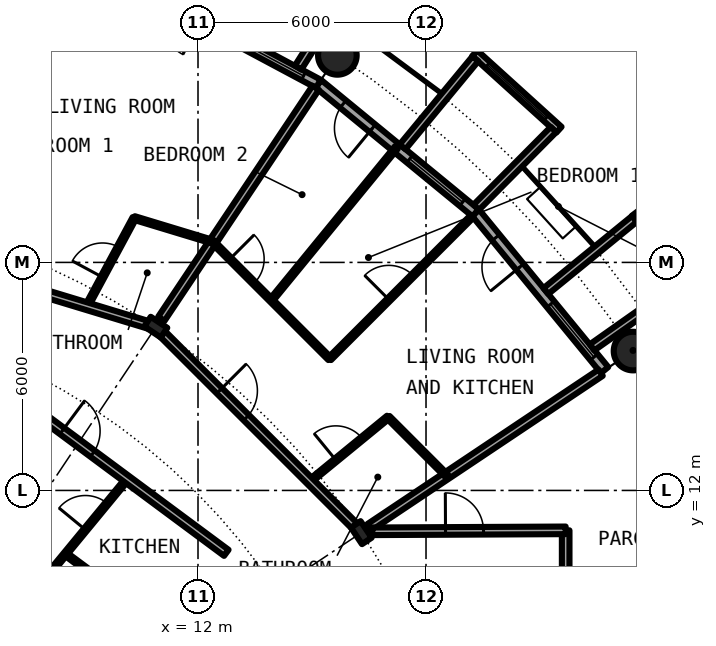
"""IFC4 building model, lengths in metres.
Left out: names, types, materials, properties, quantities, classifications, styles, units other than length and angle.
Written with IfcOpenShell. Run it as: python <this file> out.ifc"""

import sys

from ifc_helpers import new_model, si_unit, direction, frame, frame_2d, origin, origin_2d, place, context, subcontext, project, spatial, rectangle, circle, hollow_circle, i_section, extrude, element, fill, save


model = new_model("IFC4")
c1 = context("Model", 3, precision=1e-05, world=origin(), true_north=direction((0.0, 1.0)))
c2 = subcontext(c1, "Body", "Model", "MODEL_VIEW")
j1 = project(units=[si_unit("LENGTHUNIT", "METRE"), si_unit("PLANEANGLEUNIT", "RADIAN")], contexts=[c1])
p1 = place(None, origin())
s1 = spatial("IfcSite", under=j1, at=p1, CompositionType="ELEMENT")
p2 = place(p1, origin())
s2 = spatial("IfcBuilding", under=s1, at=p2, CompositionType="ELEMENT")
p3 = place(p2, frame((0.0, 0.0, 91.05)))
s3 = spatial("IfcBuildingStorey", under=s2, at=p3, CompositionType="ELEMENT", Elevation=91.05)
for number, where, z_axis, x_axis in (
    (1, (23.448, 15.667, 0.0), (0.0, 0.0, 1.0), (1.0, 0.0, 0.0)),
    (2, (15.667, 23.448, 0.0), (0.0, 0.0, 1.0), (1.0, 0.0, 0.0)),
):
    element("IfcColumn", number, at=place(p3, frame(where, z_axis=z_axis, x_axis=x_axis)), inside=s3, PredefinedType="COLUMN", context=c2, shape_type="SweptSolid", body=[
        extrude(hollow_circle(Radius=0.508, WallThickness=0.04, at=origin_2d()), origin(), (0.0, 0.0, 1.0), 3.05),
    ])
for number, where, z_axis, x_axis in (
    (3, (16.297, 10.889, 0.0), (0.0, 0.0, 1.0), (0.831, 0.556, 0.0)),
    (4, (10.889, 16.297, 0.0), (0.0, 0.0, 1.0), (0.556, 0.831, 0.0)),
):
    element("IfcColumn", number, at=place(p3, frame(where, z_axis=z_axis, x_axis=x_axis)), inside=s3, PredefinedType="COLUMN", context=c2, shape_type="SweptSolid", body=[
        extrude(i_section(OverallWidth=0.306, OverallDepth=0.524, WebThickness=0.021, FlangeThickness=0.04, FilletRadius=0.027, at=origin_2d()), origin(), (0.0, 0.0, 1.0), 3.05),
    ])
p4 = place(p3, frame((22.699, 15.167, 0.0), z_axis=(0.0, 0.0, 1.0), x_axis=(-0.634382322723, 0.773019449054, 0.0)))
e5 = element("IfcWall", 5, at=p4, inside=s3, PredefinedType="SOLIDWALL", context=c2, shape_type="SweptSolid", body=[
    extrude(rectangle(XDim=5.352, YDim=0.25, at=frame_2d((2.676, 0.0))), origin(), (0.0, 0.0, 1.0), 2.7),
])
p5 = place(p4, frame((0.441, 0.0, 0.3)))
e6 = element("IfcOpeningElement", 6, at=p5, cuts=e5, PredefinedType="OPENING", context=c2, shape_type="SweptSolid", body=[
    extrude(rectangle(XDim=1.8, YDim=2.1, at=frame_2d((0.9, 1.05))), frame((0.0, 0.135, 0.0), z_axis=(0.0, -1.0, 0.0), x_axis=(1.0, 0.0, 0.0)), (0.0, 0.0, 1.0), 0.27),
])
p6 = place(p4, frame((3.51, 0.0, 0.0)))
e7 = element("IfcOpeningElement", 7, at=p6, cuts=e5, PredefinedType="OPENING", context=c2, shape_type="SweptSolid", body=[
    extrude(rectangle(XDim=1.0, YDim=2.2, at=frame_2d((0.5, 1.1))), frame((0.0, 0.135, 0.0), z_axis=(0.0, -1.0, 0.0), x_axis=(1.0, 0.0, 0.0)), (0.0, 0.0, 1.0), 0.27),
])
p7 = place(p3, frame((24.909, 17.427, -0.03), z_axis=(0.0, 0.0, 1.0), x_axis=(-0.60418752353, 0.796842165306, 0.0)))
e8 = element("IfcWall", 8, at=p7, inside=s3, PredefinedType="SOLIDWALL", context=c2, shape_type="SweptSolid", body=[
    extrude(rectangle(XDim=2.337, YDim=0.2, at=frame_2d((1.168, 0.0))), origin(), (0.0, 0.0, 1.0), 2.73),
])
p8 = place(p7, frame((0.128, 0.0, 0.33)))
e9 = element("IfcOpeningElement", 9, at=p8, cuts=e8, PredefinedType="OPENING", context=c2, shape_type="SweptSolid", body=[
    extrude(circle(Radius=1.04, at=frame_2d((1.04, 1.04))), frame((0.0, 0.11, 0.0), z_axis=(0.0, -1.0, 0.0), x_axis=(1.0, 0.0, 0.0)), (0.0, 0.0, 1.0), 0.22),
])
p9 = place(p3, frame((22.37, 15.765, -0.03), z_axis=(0.0, 0.0, 1.0), x_axis=(0.817256123454, 0.576274612209, 0.0)))
e10 = element("IfcWall", 10, at=p9, inside=s3, PredefinedType="SOLIDWALL", context=c2, shape_type="SweptSolid", body=[
    extrude(rectangle(XDim=2.933, YDim=0.2, at=frame_2d((1.466, 0.0))), origin(), (0.0, 0.0, 1.0), 2.73),
])
p10 = place(p3, frame((21.155, 17.246, -0.03), z_axis=(0.0, 0.0, 1.0), x_axis=(0.775179004516, 0.631741648902, 0.0)))
e11 = element("IfcWall", 11, at=p10, inside=s3, PredefinedType="SOLIDWALL", context=c2, shape_type="SweptSolid", body=[
    extrude(rectangle(XDim=3.006, YDim=0.2, at=frame_2d((1.503, 0.0))), origin(), (0.0, 0.0, 1.0), 2.73),
])
p11 = place(p3, frame((19.304, 19.304, 0.0), z_axis=(0.0, 0.0, 1.0), x_axis=(-0.773019449054, 0.634382322723, 0.0)))
e12 = element("IfcWall", 12, at=p11, inside=s3, PredefinedType="SOLIDWALL", context=c2, shape_type="SweptSolid", body=[
    extrude(rectangle(XDim=5.352, YDim=0.25, at=frame_2d((2.676, 0.0))), origin(), (0.0, 0.0, 1.0), 2.7),
])
p12 = place(p11, frame((0.441, 0.0, 0.3)))
e13 = element("IfcOpeningElement", 13, at=p12, cuts=e12, PredefinedType="OPENING", context=c2, shape_type="SweptSolid", body=[
    extrude(rectangle(XDim=1.8, YDim=2.1, at=frame_2d((0.9, 1.05))), frame((0.0, 0.135, 0.0), z_axis=(0.0, -1.0, 0.0), x_axis=(1.0, 0.0, 0.0)), (0.0, 0.0, 1.0), 0.27),
])
p13 = place(p11, frame((3.51, 0.0, 0.0)))
e14 = element("IfcOpeningElement", 14, at=p13, cuts=e12, PredefinedType="OPENING", context=c2, shape_type="SweptSolid", body=[
    extrude(rectangle(XDim=1.0, YDim=2.2, at=frame_2d((0.5, 1.1))), frame((0.0, 0.135, 0.0), z_axis=(0.0, -1.0, 0.0), x_axis=(1.0, 0.0, 0.0)), (0.0, 0.0, 1.0), 0.27),
])
p14 = place(p3, frame((21.5, 21.493, -0.03), z_axis=(0.0, 0.0, 1.0), x_axis=(-0.740998365753, 0.671506829416, 0.0)))
e15 = element("IfcWall", 15, at=p14, inside=s3, PredefinedType="SOLIDWALL", context=c2, shape_type="SweptSolid", body=[
    extrude(rectangle(XDim=2.993, YDim=0.2, at=frame_2d((1.497, 0.0))), origin(), (0.0, 0.0, 1.0), 2.73),
])
p15 = place(p14, frame((0.457, 0.0, 0.33)))
e16 = element("IfcOpeningElement", 16, at=p15, cuts=e15, PredefinedType="OPENING", context=c2, shape_type="SweptSolid", body=[
    extrude(circle(Radius=1.04, at=frame_2d((1.04, 1.04))), frame((0.0, 0.11, 0.0), z_axis=(0.0, -1.0, 0.0), x_axis=(1.0, 0.0, 0.0)), (0.0, 0.0, 1.0), 0.22),
])
p16 = place(p3, frame((19.323, 19.45, -0.03), z_axis=(0.0, 0.0, 1.0), x_axis=(0.704476739375, 0.709727076896, 0.0)))
e17 = element("IfcWall", 17, at=p16, inside=s3, PredefinedType="SOLIDWALL", context=c2, shape_type="SweptSolid", body=[
    extrude(rectangle(XDim=2.883, YDim=0.2, at=frame_2d((1.441, 0.0))), origin(), (0.0, 0.0, 1.0), 2.73),
])
p17 = place(p3, frame((17.384, 21.041, -0.03), z_axis=(0.0, 0.0, 1.0), x_axis=(0.63709551667, 0.770784861449, 0.0)))
e18 = element("IfcWall", 18, at=p17, inside=s3, PredefinedType="SOLIDWALL", context=c2, shape_type="SweptSolid", body=[
    extrude(rectangle(XDim=3.006, YDim=0.2, at=frame_2d((1.503, 0.0))), origin(), (0.0, 0.0, 1.0), 2.73),
])
p18 = place(p3, frame((15.167, 22.699, 0.0), z_axis=(0.0, 0.0, 1.0), x_axis=(-0.881915646801, 0.471407246368, 0.0)))
e19 = element("IfcWall", 19, at=p18, inside=s3, PredefinedType="SOLIDWALL", context=c2, shape_type="SweptSolid", body=[
    extrude(rectangle(XDim=5.352, YDim=0.25, at=frame_2d((2.676, 0.0))), origin(), (0.0, 0.0, 1.0), 2.7),
])
p19 = place(p18, frame((0.441, 0.0, 0.3)))
e20 = element("IfcOpeningElement", 20, at=p19, cuts=e19, PredefinedType="OPENING", context=c2, shape_type="SweptSolid", body=[
    extrude(rectangle(XDim=1.8, YDim=2.1, at=frame_2d((0.9, 1.05))), frame((0.0, 0.135, 0.0), z_axis=(0.0, -1.0, 0.0), x_axis=(1.0, 0.0, 0.0)), (0.0, 0.0, 1.0), 0.27),
])
p20 = place(p18, frame((3.51, 0.0, 0.0)))
e21 = element("IfcOpeningElement", 21, at=p20, cuts=e19, PredefinedType="OPENING", context=c2, shape_type="SweptSolid", body=[
    extrude(rectangle(XDim=1.0, YDim=2.2, at=frame_2d((0.5, 1.1))), frame((0.0, 0.135, 0.0), z_axis=(0.0, -1.0, 0.0), x_axis=(1.0, 0.0, 0.0)), (0.0, 0.0, 1.0), 0.27),
])
p21 = place(p3, frame((14.635, 23.126, -0.03), z_axis=(0.0, 0.0, 1.0), x_axis=(0.534437802731, 0.845207805816, 0.0)))
e22 = element("IfcWall", 22, at=p21, inside=s3, PredefinedType="SOLIDWALL", context=c2, shape_type="SweptSolid", body=[
    extrude(rectangle(XDim=2.932, YDim=0.2, at=frame_2d((1.466, 0.0))), origin(), (0.0, 0.0, 1.0), 2.73),
])
p22 = place(p3, frame((21.675, 9.3, 0.0), z_axis=(0.0, 0.0, 1.0), x_axis=(0.0, 1.0, 0.0)))
e23 = element("IfcWall", 23, at=p22, inside=s3, PredefinedType="PARTITIONING", context=c2, shape_type="SweptSolid", body=[
    extrude(rectangle(XDim=1.65, YDim=0.2, at=frame_2d((0.825, 0.0))), origin(), (0.0, 0.0, 1.0), 2.7),
])
p23 = place(p3, frame((4.909, 5.958, 0.0), z_axis=(0.0, 0.0, 1.0), x_axis=(0.635976043025, 0.771708800454, 0.0)))
e24 = element("IfcWall", 24, at=p23, inside=s3, PredefinedType="PARTITIONING", context=c2, shape_type="SweptSolid", body=[
    extrude(rectangle(XDim=8.213, YDim=0.1, at=frame_2d((4.106, 0.0))), origin(), (0.0, 0.0, 1.0), 2.7),
])
p24 = place(p23, frame((6.49, 0.0, 0.0)))
e25 = element("IfcOpeningElement", 25, at=p24, cuts=e24, PredefinedType="OPENING", context=c2, shape_type="SweptSolid", body=[
    extrude(rectangle(XDim=0.9, YDim=2.3, at=frame_2d((0.45, 1.15))), frame((0.0, 0.06, 0.0), z_axis=(0.0, -1.0, 0.0), x_axis=(1.0, 0.0, 0.0)), (0.0, 0.0, 1.0), 0.12),
])
p25 = place(p23, frame((2.384, 0.0, 0.0)))
e26 = element("IfcOpeningElement", 26, at=p25, cuts=e24, PredefinedType="OPENING", context=c2, shape_type="SweptSolid", body=[
    extrude(rectangle(XDim=0.9, YDim=2.3, at=frame_2d((0.45, 1.15))), frame((0.0, 0.06, 0.0), z_axis=(0.0, -1.0, 0.0), x_axis=(1.0, 0.0, 0.0)), (0.0, 0.0, 1.0), 0.12),
])
p26 = place(p3, frame((9.074, 16.847, 0.0), z_axis=(0.0, 0.0, 1.0), x_axis=(0.474160570331, 0.880438387136, 0.0)))
e27 = element("IfcWall", 27, at=p26, inside=s3, PredefinedType="PARTITIONING", context=c2, shape_type="SweptSolid", body=[
    extrude(rectangle(XDim=2.636, YDim=0.1, at=frame_2d((1.318, 0.0))), origin(), (0.0, 0.0, 1.0), 2.7),
])
p27 = place(p26, frame((0.868, 0.0, 0.0)))
e28 = element("IfcOpeningElement", 28, at=p27, cuts=e27, PredefinedType="OPENING", context=c2, shape_type="SweptSolid", body=[
    extrude(rectangle(XDim=0.9, YDim=2.3, at=frame_2d((0.45, 1.15))), frame((0.0, 0.06, 0.0), z_axis=(0.0, -1.0, 0.0), x_axis=(1.0, 0.0, 0.0)), (0.0, 0.0, 1.0), 0.12),
])
p28 = place(p3, frame((11.035, 16.515, 0.0), z_axis=(0.0, 0.0, 1.0), x_axis=(0.555516661303, 0.831505405283, 0.0)))
e29 = element("IfcWall", 29, at=p28, inside=s3, PredefinedType="PARTITIONING", context=c2, shape_type="SweptSolid", body=[
    extrude(rectangle(XDim=7.312, YDim=0.2, at=frame_2d((3.656, 0.0))), origin(), (0.0, 0.0, 1.0), 2.7),
])
p29 = place(p3, frame((13.927, 17.004, 0.0), z_axis=(0.0, 0.0, 1.0), x_axis=(0.633774976367, 0.773517471898, 0.0)))
e30 = element("IfcWall", 30, at=p29, inside=s3, PredefinedType="PARTITIONING", context=c2, shape_type="SweptSolid", body=[
    extrude(rectangle(XDim=5.196, YDim=0.1, at=frame_2d((2.598, 0.0))), origin(), (0.0, 0.0, 1.0), 2.7),
])
p30 = place(p3, frame((14.945, 12.241, 0.0), z_axis=(0.0, 0.0, 1.0), x_axis=(0.77367517848, 0.633582447834, 0.0)))
e31 = element("IfcWall", 31, at=p30, inside=s3, PredefinedType="PARTITIONING", context=c2, shape_type="SweptSolid", body=[
    extrude(rectangle(XDim=2.661, YDim=0.1, at=frame_2d((1.331, 0.0))), origin(), (0.0, 0.0, 1.0), 2.7),
])
p31 = place(p30, frame((0.881, 0.0, 0.0)))
e32 = element("IfcOpeningElement", 32, at=p31, cuts=e31, PredefinedType="OPENING", context=c2, shape_type="SweptSolid", body=[
    extrude(rectangle(XDim=0.9, YDim=2.3, at=frame_2d((0.45, 1.15))), frame((0.0, 0.06, 0.0), z_axis=(0.0, -1.0, 0.0), x_axis=(1.0, 0.0, 0.0)), (0.0, 0.0, 1.0), 0.12),
])
p32 = place(p3, frame((15.465, 15.465, 0.0), z_axis=(0.0, 0.0, 1.0), x_axis=(0.707106781187, 0.707106781187, 0.0)))
e33 = element("IfcWall", 33, at=p32, inside=s3, PredefinedType="PARTITIONING", context=c2, shape_type="SweptSolid", body=[
    extrude(rectangle(XDim=5.305, YDim=0.1, at=frame_2d((2.652, 0.0))), origin(), (0.0, 0.0, 1.0), 2.7),
])
p33 = place(p32, frame((2.202, 0.0, 0.0)))
e34 = element("IfcOpeningElement", 34, at=p33, cuts=e33, PredefinedType="OPENING", context=c2, shape_type="SweptSolid", body=[
    extrude(rectangle(XDim=0.9, YDim=2.3, at=frame_2d((0.45, 1.15))), frame((0.0, 0.06, 0.0), z_axis=(0.0, -1.0, 0.0), x_axis=(1.0, 0.0, 0.0)), (0.0, 0.0, 1.0), 0.12),
])
p34 = place(p3, frame((16.515, 11.034, 0.0), z_axis=(0.0, 0.0, 1.0), x_axis=(0.831382022135, 0.555701298605, 0.0)))
e35 = element("IfcWall", 35, at=p34, inside=s3, PredefinedType="PARTITIONING", context=c2, shape_type="SweptSolid", body=[
    extrude(rectangle(XDim=7.313, YDim=0.2, at=frame_2d((3.657, 0.0))), origin(), (0.0, 0.0, 1.0), 2.7),
])
p35 = place(p3, frame((16.588, 10.925, 0.0), z_axis=(0.0, 0.0, 1.0), x_axis=(0.999988019025, 0.004895079807, 0.0)))
e36 = element("IfcWall", 36, at=p35, inside=s3, PredefinedType="PARTITIONING", context=c2, shape_type="SweptSolid", body=[
    extrude(rectangle(XDim=5.087, YDim=0.2, at=frame_2d((2.543, 0.0))), origin(), (0.0, 0.0, 1.0), 2.7),
])
p36 = place(p35, frame((1.925, 0.0, 0.0)))
e37 = element("IfcOpeningElement", 37, at=p36, cuts=e36, PredefinedType="OPENING", context=c2, shape_type="SweptSolid", body=[
    extrude(rectangle(XDim=1.0, YDim=2.3, at=frame_2d((0.5, 1.15))), frame((0.0, 0.11, 0.0), z_axis=(0.0, -1.0, 0.0), x_axis=(1.0, 0.0, 0.0)), (0.0, 0.0, 1.0), 0.22),
])
p37 = place(p3, frame((8.512, 10.332, 0.0), z_axis=(0.0, 0.0, 1.0), x_axis=(0.803135014325, -0.595797070121, 0.0)))
e38 = element("IfcWall", 38, at=p37, inside=s3, PredefinedType="PARTITIONING", context=c2, shape_type="SweptSolid", body=[
    extrude(rectangle(XDim=1.732, YDim=0.1, at=frame_2d((0.866, 0.0))), origin(), (0.0, 0.0, 1.0), 2.7),
])
p38 = place(p3, frame((4.906, 16.172, 0.0), z_axis=(0.0, 0.0, 1.0), x_axis=(0.803191461888, -0.595720971219, 0.0)))
e39 = element("IfcWall", 39, at=p38, inside=s3, PredefinedType="PARTITIONING", context=c2, shape_type="SweptSolid", body=[
    extrude(rectangle(XDim=9.76, YDim=0.2, at=frame_2d((4.88, 0.0))), origin(), (0.0, 0.0, 1.0), 2.7),
])
p39 = place(p38, frame((4.38, 0.0, 0.0)))
e40 = element("IfcOpeningElement", 40, at=p39, cuts=e39, PredefinedType="OPENING", context=c2, shape_type="SweptSolid", body=[
    extrude(rectangle(XDim=1.0, YDim=2.3, at=frame_2d((0.5, 1.15))), frame((0.0, 0.11, 0.0), z_axis=(0.0, -1.0, 0.0), x_axis=(1.0, 0.0, 0.0)), (0.0, 0.0, 1.0), 0.22),
])
p40 = place(p3, frame((-0.007, 19.599, 0.0), z_axis=(0.0, 0.0, 1.0), x_axis=(0.95700958731, -0.290056287291, 0.0)))
e41 = element("IfcWall", 41, at=p40, inside=s3, PredefinedType="PARTITIONING", context=c2, shape_type="SweptSolid", body=[
    extrude(rectangle(XDim=11.226, YDim=0.2, at=frame_2d((5.613, 0.0))), origin(), (0.0, 0.0, 1.0), 2.38),
])
p41 = place(p40, frame((7.093, 0.0, 0.0)))
e42 = element("IfcOpeningElement", 42, at=p41, cuts=e41, PredefinedType="OPENING", context=c2, shape_type="SweptSolid", body=[
    extrude(rectangle(XDim=1.0, YDim=2.3, at=frame_2d((0.5, 1.15))), frame((0.0, 0.11, 0.0), z_axis=(0.0, -1.0, 0.0), x_axis=(1.0, 0.0, 0.0)), (0.0, 0.0, 1.0), 0.22),
])
p42 = place(p3, frame((11.0, 16.186, 0.0), z_axis=(0.0, 0.0, 1.0), x_axis=(0.707106781187, -0.707106781187, 0.0)))
e43 = element("IfcWall", 43, at=p42, inside=s3, PredefinedType="PARTITIONING", context=c2, shape_type="SweptSolid", body=[
    extrude(rectangle(XDim=7.334, YDim=0.2, at=frame_2d((3.667, 0.0))), origin(), (0.0, 0.0, 1.0), 2.38),
])
p43 = place(p42, frame((2.211, 0.0, 0.0)))
e44 = element("IfcOpeningElement", 44, at=p43, cuts=e43, PredefinedType="OPENING", context=c2, shape_type="SweptSolid", body=[
    extrude(rectangle(XDim=1.0, YDim=2.3, at=frame_2d((0.5, 1.15))), frame((0.0, 0.11, 0.0), z_axis=(0.0, -1.0, 0.0), x_axis=(1.0, 0.0, 0.0)), (0.0, 0.0, 1.0), 0.22),
])
p44 = place(p3, frame((10.324, 19.168, 0.0), z_axis=(0.0, 0.0, 1.0), x_axis=(0.956993947591, -0.290107883852, 0.0)))
e45 = element("IfcWall", 45, at=p44, inside=s3, PredefinedType="PARTITIONING", context=c2, shape_type="SweptSolid", body=[
    extrude(rectangle(XDim=2.158, YDim=0.1, at=frame_2d((1.079, 0.0))), origin(), (0.0, 0.0, 1.0), 2.7),
])
p45 = place(p3, frame((12.389, 18.542, 0.0), z_axis=(0.0, 0.0, 1.0), x_axis=(0.707022606819, -0.707190945535, 0.0)))
e46 = element("IfcWall", 46, at=p45, inside=s3, PredefinedType="PARTITIONING", context=c2, shape_type="SweptSolid", body=[
    extrude(rectangle(XDim=4.351, YDim=0.1, at=frame_2d((2.175, 0.0))), origin(), (0.0, 0.0, 1.0), 2.7),
])
p46 = place(p45, frame((0.639, 0.0, 0.0)))
e47 = element("IfcOpeningElement", 47, at=p46, cuts=e46, PredefinedType="OPENING", context=c2, shape_type="SweptSolid", body=[
    extrude(rectangle(XDim=0.9, YDim=2.3, at=frame_2d((0.45, 1.15))), frame((0.0, 0.06, 0.0), z_axis=(0.0, -1.0, 0.0), x_axis=(1.0, 0.0, 0.0)), (0.0, 0.0, 1.0), 0.12),
])
p47 = place(p3, frame((17.006, 13.924, 0.0), z_axis=(0.0, 0.0, 1.0), x_axis=(0.706826194425, -0.707387256653, 0.0)))
e48 = element("IfcWall", 48, at=p47, inside=s3, PredefinedType="PARTITIONING", context=c2, shape_type="SweptSolid", body=[
    extrude(rectangle(XDim=2.176, YDim=0.1, at=frame_2d((1.088, 0.0))), origin(), (0.0, 0.0, 1.0), 2.7),
])
p48 = place(p5, origin())
e49 = element("IfcWindow", 49, at=p48, inside=s3, PartitioningType="SINGLE_PANEL", PredefinedType="WINDOW", context=c2, shape_type="SweptSolid", body=[
    extrude(rectangle(XDim=1.8, YDim=2.1, at=frame_2d((0.9, 1.05))), frame((0.0, 0.03, 0.0), z_axis=(0.0, -1.0, 0.0), x_axis=(1.0, 0.0, 0.0)), (0.0, 0.0, 1.0), 0.06),
])
fill(e6, e49)
p49 = place(p6, origin())
e50 = element("IfcDoor", 50, at=p49, inside=s3, OperationType="SINGLE_SWING_LEFT", PredefinedType="DOOR", context=c2, shape_type="SweptSolid", body=[
    extrude(rectangle(XDim=1.0, YDim=2.2, at=frame_2d((0.5, 1.1))), frame((0.0, 0.025, 0.0), z_axis=(0.0, -1.0, 0.0), x_axis=(1.0, 0.0, 0.0)), (0.0, 0.0, 1.0), 0.05),
])
fill(e7, e50)
p50 = place(p12, origin())
e51 = element("IfcWindow", 51, at=p50, inside=s3, PartitioningType="SINGLE_PANEL", PredefinedType="WINDOW", context=c2, shape_type="SweptSolid", body=[
    extrude(rectangle(XDim=1.8, YDim=2.1, at=frame_2d((0.9, 1.05))), frame((0.0, 0.03, 0.0), z_axis=(0.0, -1.0, 0.0), x_axis=(1.0, 0.0, 0.0)), (0.0, 0.0, 1.0), 0.06),
])
fill(e13, e51)
p51 = place(p15, origin())
e52 = element("IfcWindow", 52, at=p51, inside=s3, PartitioningType="SINGLE_PANEL", PredefinedType="WINDOW", context=c2, shape_type="SweptSolid", body=[
    extrude(circle(Radius=1.04, at=frame_2d((1.04, 1.04))), frame((0.0, 0.03, 0.0), z_axis=(0.0, -1.0, 0.0), x_axis=(1.0, 0.0, 0.0)), (0.0, 0.0, 1.0), 0.06),
])
fill(e16, e52)
p52 = place(p13, origin())
e53 = element("IfcDoor", 53, at=p52, inside=s3, OperationType="SINGLE_SWING_LEFT", PredefinedType="DOOR", context=c2, shape_type="SweptSolid", body=[
    extrude(rectangle(XDim=1.0, YDim=2.2, at=frame_2d((0.5, 1.1))), frame((0.0, 0.025, 0.0), z_axis=(0.0, -1.0, 0.0), x_axis=(1.0, 0.0, 0.0)), (0.0, 0.0, 1.0), 0.05),
])
fill(e14, e53)
p53 = place(p19, origin())
e54 = element("IfcWindow", 54, at=p53, inside=s3, PartitioningType="SINGLE_PANEL", PredefinedType="WINDOW", context=c2, shape_type="SweptSolid", body=[
    extrude(rectangle(XDim=1.8, YDim=2.1, at=frame_2d((0.9, 1.05))), frame((0.0, 0.03, 0.0), z_axis=(0.0, -1.0, 0.0), x_axis=(1.0, 0.0, 0.0)), (0.0, 0.0, 1.0), 0.06),
])
fill(e20, e54)
p54 = place(p43, origin())
e55 = element("IfcDoor", 55, at=p54, inside=s3, OperationType="SINGLE_SWING_LEFT", PredefinedType="DOOR", context=c2, shape_type="SweptSolid", body=[
    extrude(rectangle(XDim=1.0, YDim=2.3, at=frame_2d((0.5, 1.15))), frame((0.0, 0.025, 0.0), z_axis=(0.0, -1.0, 0.0), x_axis=(1.0, 0.0, 0.0)), (0.0, 0.0, 1.0), 0.05),
])
fill(e44, e55)
p55 = place(p31, origin())
e56 = element("IfcDoor", 56, at=p55, inside=s3, OperationType="SINGLE_SWING_LEFT", PredefinedType="DOOR", context=c2, shape_type="SweptSolid", body=[
    extrude(rectangle(XDim=0.9, YDim=2.3, at=frame_2d((0.45, 1.15))), frame((0.0, 0.025, 0.0), z_axis=(0.0, -1.0, 0.0), x_axis=(1.0, 0.0, 0.0)), (0.0, 0.0, 1.0), 0.05),
])
fill(e32, e56)
p56 = place(p33, origin())
e57 = element("IfcDoor", 57, at=p56, inside=s3, OperationType="SINGLE_SWING_RIGHT", PredefinedType="DOOR", context=c2, shape_type="SweptSolid", body=[
    extrude(rectangle(XDim=0.9, YDim=2.3, at=frame_2d((0.45, 1.15))), frame((0.0, 0.025, 0.0), z_axis=(0.0, -1.0, 0.0), x_axis=(1.0, 0.0, 0.0)), (0.0, 0.0, 1.0), 0.05),
])
fill(e34, e57)
p57 = place(p46, origin())
e58 = element("IfcDoor", 58, at=p57, inside=s3, OperationType="SINGLE_SWING_LEFT", PredefinedType="DOOR", context=c2, shape_type="SweptSolid", body=[
    extrude(rectangle(XDim=0.9, YDim=2.3, at=frame_2d((0.45, 1.15))), frame((0.0, 0.025, 0.0), z_axis=(0.0, -1.0, 0.0), x_axis=(1.0, 0.0, 0.0)), (0.0, 0.0, 1.0), 0.05),
])
fill(e47, e58)
p58 = place(p27, origin())
e59 = element("IfcDoor", 59, at=p58, inside=s3, OperationType="SINGLE_SWING_RIGHT", PredefinedType="DOOR", context=c2, shape_type="SweptSolid", body=[
    extrude(rectangle(XDim=0.9, YDim=2.3, at=frame_2d((0.45, 1.15))), frame((0.0, 0.025, 0.0), z_axis=(0.0, -1.0, 0.0), x_axis=(1.0, 0.0, 0.0)), (0.0, 0.0, 1.0), 0.05),
])
fill(e28, e59)
p59 = place(p39, origin())
e60 = element("IfcDoor", 60, at=p59, inside=s3, OperationType="SINGLE_SWING_LEFT", PredefinedType="DOOR", context=c2, shape_type="SweptSolid", body=[
    extrude(rectangle(XDim=1.0, YDim=2.3, at=frame_2d((0.5, 1.15))), frame((0.0, 0.025, 0.0), z_axis=(0.0, -1.0, 0.0), x_axis=(1.0, 0.0, 0.0)), (0.0, 0.0, 1.0), 0.05),
])
fill(e40, e60)
p60 = place(p24, origin())
e61 = element("IfcDoor", 61, at=p60, inside=s3, OperationType="SINGLE_SWING_RIGHT", PredefinedType="DOOR", context=c2, shape_type="SweptSolid", body=[
    extrude(rectangle(XDim=0.9, YDim=2.3, at=frame_2d((0.45, 1.15))), frame((0.0, 0.025, 0.0), z_axis=(0.0, -1.0, 0.0), x_axis=(1.0, 0.0, 0.0)), (0.0, 0.0, 1.0), 0.05),
])
fill(e25, e61)
p61 = place(p36, origin())
e62 = element("IfcDoor", 62, at=p61, inside=s3, OperationType="SINGLE_SWING_LEFT", PredefinedType="DOOR", context=c2, shape_type="SweptSolid", body=[
    extrude(rectangle(XDim=1.0, YDim=2.3, at=frame_2d((0.5, 1.15))), frame((0.0, 0.025, 0.0), z_axis=(0.0, -1.0, 0.0), x_axis=(1.0, 0.0, 0.0)), (0.0, 0.0, 1.0), 0.05),
])
fill(e37, e62)
save(model, sys.argv[1])
